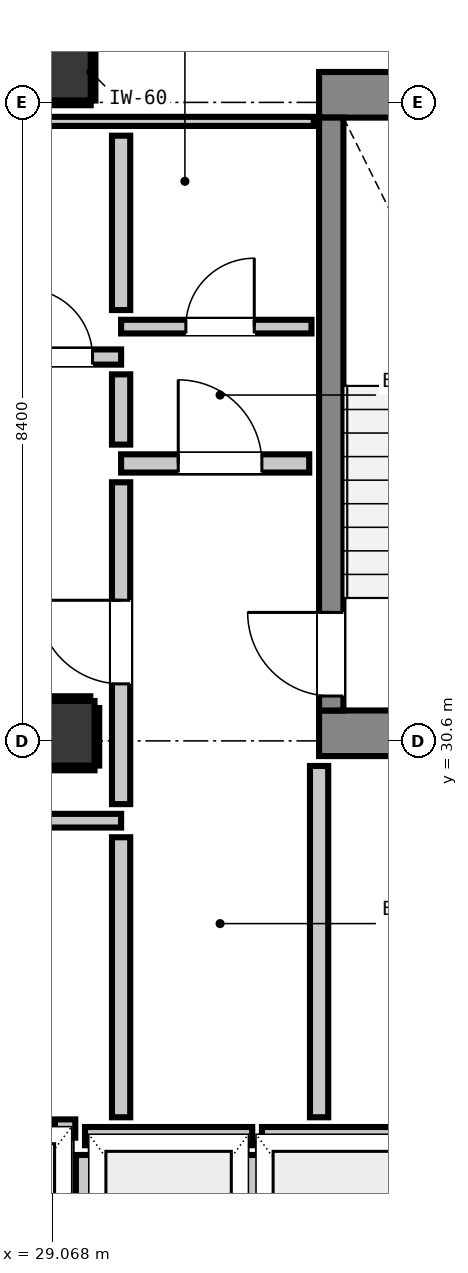
"""IFC4 building model, lengths in metres.
Left out: names, types, materials, properties, quantities, classifications, styles, units other than length and angle.
Written with IfcOpenShell. Run it as: python <this file> out.ifc"""

import sys

from ifc_helpers import new_model, si_unit, direction, frame, frame_2d, origin, origin_2d, place, context, subcontext, project, spatial, rectangle, extrude, element, fill, save


model = new_model("IFC4")
c1 = context("Model", 3, precision=1e-05, world=origin(), true_north=direction((0.0, 1.0)))
c2 = subcontext(c1, "Body", "Model", "MODEL_VIEW")
j1 = project(units=[si_unit("LENGTHUNIT", "METRE"), si_unit("PLANEANGLEUNIT", "RADIAN")], contexts=[c1])
p1 = place(None, origin())
s1 = spatial("IfcSite", under=j1, at=p1, CompositionType="ELEMENT")
p2 = place(p1, origin())
s2 = spatial("IfcBuilding", under=s1, at=p2, CompositionType="ELEMENT")
p3 = place(p2, frame((0.0, 0.0, 176.88)))
s3 = spatial("IfcBuildingStorey", under=s2, at=p3, CompositionType="ELEMENT", Elevation=176.88)
p4 = place(p3, frame((29.2, 39.4, 0.0), z_axis=(0.0, 0.0, 1.0), x_axis=(1.0, 0.0, 0.0)))
e1 = element("IfcColumn", 1, at=p4, inside=s3, PredefinedType="COLUMN", context=c2, shape_type="SweptSolid", body=[
    extrude(rectangle(XDim=0.75, YDim=0.75, at=origin_2d()), origin(), (0.0, 0.0, 1.0), 3.32),
])
p5 = place(p3, frame((32.58, 39.1, 0.0), z_axis=(0.0, 0.0, 1.0), x_axis=(1.0, 0.0, 0.0)))
e2 = element("IfcWall", 2, at=p5, inside=s3, PredefinedType="SHEAR", context=c2, shape_type="SweptSolid", body=[
    extrude(rectangle(XDim=4.08, YDim=0.6, at=frame_2d((2.04, 0.0))), origin(), (0.0, 0.0, 1.0), 3.32),
])
p6 = place(p3, frame((32.58, 30.7, 0.0), z_axis=(0.0, 0.0, 1.0), x_axis=(1.0, 0.0, 0.0)))
e3 = element("IfcWall", 3, at=p6, inside=s3, PredefinedType="SHEAR", context=c2, shape_type="SweptSolid", body=[
    extrude(rectangle(XDim=3.54, YDim=0.6, at=frame_2d((1.77, 0.0))), origin(), (0.0, 0.0, 1.0), 3.32),
])
p7 = place(p3, frame((32.74, 31.0, 0.0), z_axis=(0.0, 0.0, 1.0), x_axis=(0.0, 1.0, 0.0)))
e4 = element("IfcWall", 4, at=p7, inside=s3, PredefinedType="SHEAR", context=c2, shape_type="SweptSolid", body=[
    extrude(rectangle(XDim=7.8, YDim=0.32, at=frame_2d((3.9, 0.0))), origin(), (0.0, 0.0, 1.0), 3.32),
])
p8 = place(p7, frame((0.19, 0.0, 0.0)))
e5 = element("IfcOpeningElement", 5, at=p8, cuts=e4, PredefinedType="OPENING", context=c2, shape_type="SweptSolid", body=[
    extrude(rectangle(XDim=1.1, YDim=2.15, at=frame_2d((0.55, 1.075))), frame((0.0, 0.17, 0.0), z_axis=(0.0, -1.0, 0.0), x_axis=(1.0, 0.0, 0.0)), (0.0, 0.0, 1.0), 0.34),
])
p9 = place(p3, frame((29.2, 30.7, 0.0), z_axis=(0.0, 0.0, 1.0), x_axis=(1.0, 0.0, 0.0)))
e6 = element("IfcColumn", 6, at=p9, inside=s3, PredefinedType="COLUMN", context=c2, shape_type="SweptSolid", body=[
    extrude(rectangle(XDim=0.85, YDim=0.85, at=origin_2d()), origin(), (0.0, 0.0, 1.0), 3.32),
])
p10 = place(p3, frame((29.5, 25.4, 0.0), z_axis=(0.0, 0.0, 1.0), x_axis=(1.0, 0.0, 0.0)))
e7 = element("IfcWall", 7, at=p10, inside=s3, PredefinedType="PARTITIONING", context=c2, shape_type="SweptSolid", body=[
    extrude(rectangle(XDim=2.2, YDim=0.24, at=frame_2d((1.1, 0.0))), origin(), (0.0, 0.0, 1.0), 3.08),
])
p11 = place(p3, frame((29.5, 22.848, 0.0), z_axis=(0.0, 0.0, 1.0), x_axis=(0.0, 1.0, 0.0)))
e8 = element("IfcWall", 8, at=p11, inside=s3, PredefinedType="PARTITIONING", context=c2, shape_type="SweptSolid", body=[
    extrude(rectangle(XDim=2.304, YDim=0.24, at=frame_2d((1.152, 0.0))), origin(), (0.0, 0.0, 1.0), 2.315),
])
p12 = place(p3, frame((31.7, 22.848, 0.0), z_axis=(0.0, 0.0, 1.0), x_axis=(0.0, 1.0, 0.0)))
e9 = element("IfcWall", 9, at=p12, inside=s3, PredefinedType="PARTITIONING", context=c2, shape_type="SweptSolid", body=[
    extrude(rectangle(XDim=2.304, YDim=0.24, at=frame_2d((1.152, 0.0))), origin(), (0.0, 0.0, 1.0), 3.08),
])
p13 = place(p3, frame((31.828, 25.4, 0.0), z_axis=(0.0, 0.0, 1.0), x_axis=(1.0, 0.0, 0.0)))
e10 = element("IfcWall", 10, at=p13, inside=s3, PredefinedType="PARTITIONING", context=c2, shape_type="SweptSolid", body=[
    extrude(rectangle(XDim=2.072, YDim=0.24, at=frame_2d((1.036, 0.0))), origin(), (0.0, 0.0, 1.0), 3.08),
])
p14 = place(p3, frame((29.103, 25.5, 0.0), z_axis=(0.0, 0.0, 1.0), x_axis=(1.0, 0.0, 0.0)))
e11 = element("IfcWall", 11, at=p14, inside=s3, PredefinedType="PARTITIONING", context=c2, shape_type="SweptSolid", body=[
    extrude(rectangle(XDim=0.269, YDim=0.24, at=frame_2d((0.135, 0.0))), origin(), (0.0, 0.0, 1.0), 3.08),
])
p15 = place(p3, frame((29.975, 34.25, 0.0), z_axis=(0.0, 0.0, 1.0), x_axis=(1.0, 0.0, 0.0)))
e12 = element("IfcWall", 12, at=p15, inside=s3, PredefinedType="PARTITIONING", context=c2, shape_type="SweptSolid", body=[
    extrude(rectangle(XDim=2.475, YDim=0.24, at=frame_2d((1.237, 0.0))), origin(), (0.0, 0.0, 1.0), 3.08),
])
p16 = place(p15, frame((0.752, 0.0, 0.0)))
e13 = element("IfcOpeningElement", 13, at=p16, cuts=e12, PredefinedType="OPENING", context=c2, shape_type="SweptSolid", body=[
    extrude(rectangle(XDim=1.1, YDim=2.15, at=frame_2d((0.55, 1.075))), frame((0.0, 0.13, 0.0), z_axis=(0.0, -1.0, 0.0), x_axis=(1.0, 0.0, 0.0)), (0.0, 0.0, 1.0), 0.26),
])
p17 = place(p3, frame((18.95, 35.65, 0.0), z_axis=(0.0, 0.0, 1.0), x_axis=(1.0, 0.0, 0.0)))
e14 = element("IfcWall", 14, at=p17, inside=s3, PredefinedType="PARTITIONING", context=c2, shape_type="SweptSolid", body=[
    extrude(rectangle(XDim=11.025, YDim=0.2, at=frame_2d((5.513, 0.0))), origin(), (0.0, 0.0, 1.0), 3.08),
])
p18 = place(p17, frame((9.749, 0.0, 0.0)))
e15 = element("IfcOpeningElement", 15, at=p18, cuts=e14, PredefinedType="OPENING", context=c2, shape_type="SweptSolid", body=[
    extrude(rectangle(XDim=0.9, YDim=2.1, at=frame_2d((0.45, 1.05))), frame((0.0, 0.11, 0.0), z_axis=(0.0, -1.0, 0.0), x_axis=(1.0, 0.0, 0.0)), (0.0, 0.0, 1.0), 0.22),
])
p19 = place(p3, frame((28.593, 29.55, 0.0), z_axis=(0.0, 0.0, 1.0), x_axis=(1.0, 0.0, 0.0)))
e16 = element("IfcWall", 16, at=p19, inside=s3, PredefinedType="PARTITIONING", context=c2, shape_type="SweptSolid", body=[
    extrude(rectangle(XDim=1.382, YDim=0.18, at=frame_2d((0.691, 0.0))), origin(), (0.0, 0.0, 1.0), 3.08),
])
p20 = place(p3, frame((29.975, 36.05, 0.0), z_axis=(0.0, 0.0, 1.0), x_axis=(1.0, 0.0, 0.0)))
e17 = element("IfcWall", 17, at=p20, inside=s3, PredefinedType="PARTITIONING", context=c2, shape_type="SweptSolid", body=[
    extrude(rectangle(XDim=2.505, YDim=0.18, at=frame_2d((1.252, 0.0))), origin(), (0.0, 0.0, 1.0), 3.08),
])
p21 = place(p20, frame((0.852, 0.0, 0.0)))
e18 = element("IfcOpeningElement", 18, at=p21, cuts=e17, PredefinedType="OPENING", context=c2, shape_type="SweptSolid", body=[
    extrude(rectangle(XDim=0.9, YDim=2.1, at=frame_2d((0.45, 1.05))), frame((0.0, 0.1, 0.0), z_axis=(0.0, -1.0, 0.0), x_axis=(1.0, 0.0, 0.0)), (0.0, 0.0, 1.0), 0.2),
])
p22 = place(p3, frame((18.95, 38.75, 0.0), z_axis=(0.0, 0.0, 1.0), x_axis=(1.0, 0.0, 0.0)))
e19 = element("IfcWall", 19, at=p22, inside=s3, PredefinedType="PARTITIONING", context=c2, shape_type="SweptSolid", body=[
    extrude(rectangle(XDim=13.56, YDim=0.12, at=frame_2d((6.78, 0.0))), origin(), (0.0, 0.0, 1.0), 3.08),
])
p23 = place(p3, frame((29.975, 25.648, 0.0), z_axis=(0.0, 0.0, 1.0), x_axis=(0.0, 1.0, 0.0)))
e20 = element("IfcWall", 20, at=p23, inside=s3, PredefinedType="PARTITIONING", context=c2, shape_type="SweptSolid", body=[
    extrude(rectangle(XDim=3.684, YDim=0.24, at=frame_2d((1.842, 0.0))), origin(), (0.0, 0.0, 1.0), 3.08),
])
p24 = place(p3, frame((29.975, 29.768, 0.0), z_axis=(0.0, 0.0, 1.0), x_axis=(0.0, 1.0, 0.0)))
e21 = element("IfcWall", 21, at=p24, inside=s3, PredefinedType="PARTITIONING", context=c2, shape_type="SweptSolid", body=[
    extrude(rectangle(XDim=4.234, YDim=0.24, at=frame_2d((2.117, 0.0))), origin(), (0.0, 0.0, 1.0), 3.08),
])
p25 = place(p24, frame((1.582, 0.0, 0.0)))
e22 = element("IfcOpeningElement", 22, at=p25, cuts=e21, PredefinedType="OPENING", context=c2, shape_type="SweptSolid", body=[
    extrude(rectangle(XDim=1.1, YDim=2.15, at=frame_2d((0.55, 1.075))), frame((0.0, 0.13, 0.0), z_axis=(0.0, -1.0, 0.0), x_axis=(1.0, 0.0, 0.0)), (0.0, 0.0, 1.0), 0.26),
])
p26 = place(p3, frame((29.975, 34.498, 0.0), z_axis=(0.0, 0.0, 1.0), x_axis=(0.0, 1.0, 0.0)))
e23 = element("IfcWall", 23, at=p26, inside=s3, PredefinedType="PARTITIONING", context=c2, shape_type="SweptSolid", body=[
    extrude(rectangle(XDim=0.924, YDim=0.24, at=frame_2d((0.462, 0.0))), origin(), (0.0, 0.0, 1.0), 3.08),
])
p27 = place(p3, frame((29.975, 36.268, 0.0), z_axis=(0.0, 0.0, 1.0), x_axis=(0.0, 1.0, 0.0)))
e24 = element("IfcWall", 24, at=p27, inside=s3, PredefinedType="PARTITIONING", context=c2, shape_type="SweptSolid", body=[
    extrude(rectangle(XDim=2.294, YDim=0.24, at=frame_2d((1.147, 0.0))), origin(), (0.0, 0.0, 1.0), 3.08),
])
p28 = place(p3, frame((32.58, 25.648, 0.0), z_axis=(0.0, 0.0, 1.0), x_axis=(0.0, 1.0, 0.0)))
e25 = element("IfcWall", 25, at=p28, inside=s3, PredefinedType="PARTITIONING", context=c2, shape_type="SweptSolid", body=[
    extrude(rectangle(XDim=4.622, YDim=0.24, at=frame_2d((2.311, 0.0))), origin(), (0.0, 0.0, 1.0), 3.08),
])
p29 = place(p3, frame((28.833, 38.993, 0.0), z_axis=(0.0, 0.0, 1.0), x_axis=(1.0, 0.0, 0.0)))
e26 = element("IfcWall", 26, at=p29, inside=s3, PredefinedType="PARTITIONING", context=c2, shape_type="SweptSolid", body=[
    extrude(rectangle(XDim=0.742, YDim=0.06, at=frame_2d((0.371, 0.0))), origin(), (0.0, 0.0, 1.0), 1.45),
])
p30 = place(p3, frame((29.607, 39.025, 0.0), z_axis=(0.0, 0.0, 1.0), x_axis=(0.0, 1.0, 0.0)))
e27 = element("IfcWall", 27, at=p30, inside=s3, PredefinedType="PARTITIONING", context=c2, shape_type="SweptSolid", body=[
    extrude(rectangle(XDim=0.75, YDim=0.06, at=frame_2d((0.375, 0.0))), origin(), (0.0, 0.0, 1.0), 1.45),
])
p31 = place(p3, frame((28.775, 30.243, 0.0), z_axis=(0.0, 0.0, 1.0), x_axis=(1.0, 0.0, 0.0)))
e28 = element("IfcWall", 28, at=p31, inside=s3, PredefinedType="PARTITIONING", context=c2, shape_type="SweptSolid", body=[
    extrude(rectangle(XDim=0.85, YDim=0.06, at=frame_2d((0.425, 0.0))), origin(), (0.0, 0.0, 1.0), 1.45),
])
p32 = place(p3, frame((28.775, 31.157, 0.0), z_axis=(0.0, 0.0, 1.0), x_axis=(1.0, 0.0, 0.0)))
e29 = element("IfcWall", 29, at=p32, inside=s3, PredefinedType="PARTITIONING", context=c2, shape_type="SweptSolid", body=[
    extrude(rectangle(XDim=0.794, YDim=0.06, at=frame_2d((0.397, 0.0))), origin(), (0.0, 0.0, 1.0), 1.45),
])
p33 = place(p3, frame((29.657, 30.275, 0.0), z_axis=(0.0, 0.0, 1.0), x_axis=(0.0, 1.0, 0.0)))
e30 = element("IfcWall", 30, at=p33, inside=s3, PredefinedType="PARTITIONING", context=c2, shape_type="SweptSolid", body=[
    extrude(rectangle(XDim=0.757, YDim=0.06, at=frame_2d((0.378, 0.0))), origin(), (0.0, 0.0, 1.0), 1.45),
])
p34 = place(p8, origin())
e31 = element("IfcDoor", 31, at=p34, inside=s3, OperationType="SINGLE_SWING_RIGHT", PredefinedType="DOOR", context=c2, shape_type="SweptSolid", body=[
    extrude(rectangle(XDim=1.1, YDim=2.15, at=frame_2d((0.55, 1.075))), frame((0.0, 0.025, 0.0), z_axis=(0.0, -1.0, 0.0), x_axis=(1.0, 0.0, 0.0)), (0.0, 0.0, 1.0), 0.05),
])
fill(e5, e31)
p35 = place(p25, origin())
e32 = element("IfcDoor", 32, at=p35, inside=s3, OperationType="SINGLE_SWING_RIGHT", PredefinedType="DOOR", context=c2, shape_type="SweptSolid", body=[
    extrude(rectangle(XDim=1.1, YDim=2.15, at=frame_2d((0.55, 1.075))), frame((0.0, 0.025, 0.0), z_axis=(0.0, -1.0, 0.0), x_axis=(1.0, 0.0, 0.0)), (0.0, 0.0, 1.0), 0.05),
])
fill(e22, e32)
p36 = place(p16, origin())
e33 = element("IfcDoor", 33, at=p36, inside=s3, OperationType="SINGLE_SWING_LEFT", PredefinedType="DOOR", context=c2, shape_type="SweptSolid", body=[
    extrude(rectangle(XDim=1.1, YDim=2.15, at=frame_2d((0.55, 1.075))), frame((0.0, 0.025, 0.0), z_axis=(0.0, -1.0, 0.0), x_axis=(1.0, 0.0, 0.0)), (0.0, 0.0, 1.0), 0.05),
])
fill(e13, e33)
p37 = place(p21, origin())
e34 = element("IfcDoor", 34, at=p37, inside=s3, OperationType="SINGLE_SWING_RIGHT", PredefinedType="DOOR", context=c2, shape_type="SweptSolid", body=[
    extrude(rectangle(XDim=0.9, YDim=2.1, at=frame_2d((0.45, 1.05))), frame((0.0, 0.025, 0.0), z_axis=(0.0, -1.0, 0.0), x_axis=(1.0, 0.0, 0.0)), (0.0, 0.0, 1.0), 0.05),
])
fill(e18, e34)
p38 = place(p18, origin())
e35 = element("IfcDoor", 35, at=p38, inside=s3, OperationType="SINGLE_SWING_LEFT", PredefinedType="DOOR", context=c2, shape_type="SweptSolid", body=[
    extrude(rectangle(XDim=0.9, YDim=2.1, at=frame_2d((0.45, 1.05))), frame((0.0, 0.025, 0.0), z_axis=(0.0, -1.0, 0.0), x_axis=(1.0, 0.0, 0.0)), (0.0, 0.0, 1.0), 0.05),
])
fill(e15, e35)
save(model, sys.argv[1])
